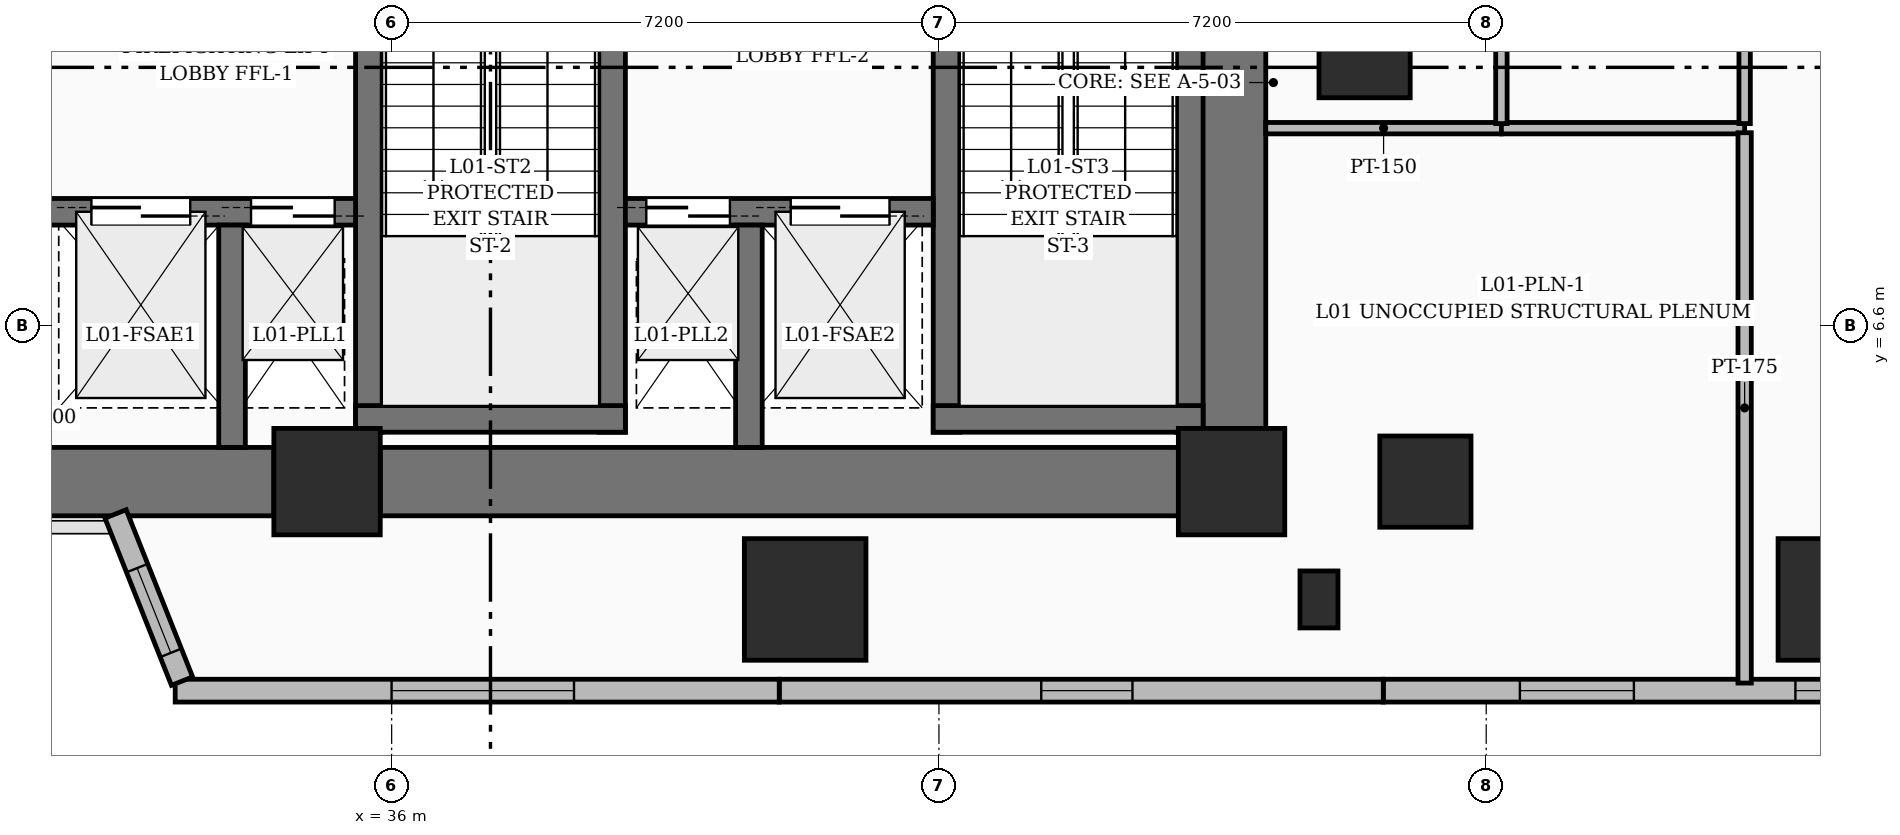
"""IFC4 building model, lengths in metres.
Left out: names, types, materials, properties, quantities, classifications, styles, units other than length and angle.
Written with IfcOpenShell. Run it as: python <this file> out.ifc"""

import sys

from ifc_helpers import new_model, si_unit, direction, frame, frame_2d, origin, origin_2d, place, context, subcontext, project, spatial, rectangle, extrude, element, fill, save


model = new_model("IFC4")
c1 = context("Model", 3, precision=1e-05, world=origin(), true_north=direction((0.0, 1.0)))
c2 = subcontext(c1, "Body", "Model", "MODEL_VIEW")
j1 = project(units=[si_unit("LENGTHUNIT", "METRE"), si_unit("PLANEANGLEUNIT", "RADIAN")], contexts=[c1])
p1 = place(None, origin())
s1 = spatial("IfcSite", under=j1, at=p1, CompositionType="ELEMENT")
p2 = place(p1, origin())
s2 = spatial("IfcBuilding", under=s1, at=p2, CompositionType="ELEMENT")
p3 = place(p2, frame((0.0, 0.0, 8.4)))
s3 = spatial("IfcBuildingStorey", under=s2, at=p3, CompositionType="ELEMENT", Elevation=8.4)
for number, where, z_axis, x_axis in (
    (1, (35.15, 4.55, 0.0), (0.0, 0.0, 1.0), (1.0, 0.0, 0.0)),
    (2, (47.05, 4.55, 0.0), (0.0, 0.0, 1.0), (1.0, 0.0, 0.0)),
):
    element("IfcColumn", number, at=place(p3, frame(where, z_axis=z_axis, x_axis=x_axis)), inside=s3, PredefinedType="COLUMN", context=c2, shape_type="SweptSolid", body=[
        extrude(rectangle(XDim=1.4, YDim=1.4, at=origin_2d()), origin(), (0.0, 0.0, 1.0), 4.5),
    ])
for number, where, z_axis, x_axis in (
    (3, (49.6, 4.55, 0.0), (0.0, 0.0, 1.0), (1.0, 0.0, 0.0)),
    (4, (48.8, 10.2, 0.0), (0.0, 0.0, 1.0), (1.0, 0.0, 0.0)),
):
    element("IfcColumn", number, at=place(p3, frame(where, z_axis=z_axis, x_axis=x_axis)), inside=s3, PredefinedType="COLUMN", context=c2, shape_type="SweptSolid", body=[
        extrude(rectangle(XDim=1.2, YDim=1.2, at=origin_2d()), origin(), (0.0, 0.0, 1.0), 4.5),
    ])
p4 = place(p3, frame((28.25, 4.55, 0.0), z_axis=(0.0, 0.0, 1.0), x_axis=(1.0, 0.0, 0.0)))
e5 = element("IfcWall", 5, at=p4, inside=s3, PredefinedType="SHEAR", context=c2, shape_type="SweptSolid", body=[
    extrude(rectangle(XDim=6.2, YDim=0.9, at=frame_2d((3.1, 0.0))), origin(), (0.0, 0.0, 1.0), 4.5),
])
p5 = place(p3, frame((35.85, 4.55, 0.0), z_axis=(0.0, 0.0, 1.0), x_axis=(1.0, 0.0, 0.0)))
e6 = element("IfcWall", 6, at=p5, inside=s3, PredefinedType="SHEAR", context=c2, shape_type="SweptSolid", body=[
    extrude(rectangle(XDim=10.5, YDim=0.9, at=frame_2d((5.25, 0.0))), origin(), (0.0, 0.0, 1.0), 4.5),
])
p6 = place(p3, frame((47.05, 5.25, 0.0), z_axis=(0.0, 0.0, 1.0), x_axis=(0.0, 1.0, 0.0)))
e7 = element("IfcWall", 7, at=p6, inside=s3, PredefinedType="SHEAR", context=c2, shape_type="SweptSolid", body=[
    extrude(rectangle(XDim=8.8, YDim=0.9, at=frame_2d((4.4, 0.0))), origin(), (0.0, 0.0, 1.0), 4.5),
])
p7 = place(p3, frame((35.7, 5.2, 0.0), z_axis=(0.0, 0.0, 1.0), x_axis=(0.0, 1.0, 0.0)))
e8 = element("IfcWall", 8, at=p7, inside=s3, PredefinedType="SOLIDWALL", context=c2, shape_type="SweptSolid", body=[
    extrude(rectangle(XDim=9.1, YDim=0.35, at=frame_2d((4.55, 0.0))), origin(), (0.0, 0.0, 1.0), 4.5),
])
p8 = place(p7, frame((6.02, 0.0, 0.0)))
e9 = element("IfcOpeningElement", 9, at=p8, cuts=e8, PredefinedType="OPENING", context=c2, shape_type="SweptSolid", body=[
    extrude(rectangle(XDim=1.0, YDim=2.15, at=frame_2d((0.5, 1.075))), frame((0.0, 0.185, 0.0), z_axis=(0.0, -1.0, 0.0), x_axis=(1.0, 0.0, 0.0)), (0.0, 0.0, 1.0), 0.37),
])
p9 = place(p3, frame((38.9, 5.2, 0.0), z_axis=(0.0, 0.0, 1.0), x_axis=(0.0, 1.0, 0.0)))
e10 = element("IfcWall", 10, at=p9, inside=s3, PredefinedType="SOLIDWALL", context=c2, shape_type="SweptSolid", body=[
    extrude(rectangle(XDim=9.1, YDim=0.35, at=frame_2d((4.55, 0.0))), origin(), (0.0, 0.0, 1.0), 4.5),
])
p10 = place(p9, frame((6.02, 0.0, 0.0)))
e11 = element("IfcOpeningElement", 11, at=p10, cuts=e10, PredefinedType="OPENING", context=c2, shape_type="SweptSolid", body=[
    extrude(rectangle(XDim=1.0, YDim=2.15, at=frame_2d((0.5, 1.075))), frame((0.0, 0.185, 0.0), z_axis=(0.0, -1.0, 0.0), x_axis=(1.0, 0.0, 0.0)), (0.0, 0.0, 1.0), 0.37),
])
p11 = place(p3, frame((35.525, 5.375, 0.0), z_axis=(0.0, 0.0, 1.0), x_axis=(1.0, 0.0, 0.0)))
e12 = element("IfcWall", 12, at=p11, inside=s3, PredefinedType="SOLIDWALL", context=c2, shape_type="SweptSolid", body=[
    extrude(rectangle(XDim=3.55, YDim=0.35, at=frame_2d((1.775, 0.0))), origin(), (0.0, 0.0, 1.0), 4.5),
])
p12 = place(p3, frame((43.3, 5.2, 0.0), z_axis=(0.0, 0.0, 1.0), x_axis=(0.0, 1.0, 0.0)))
e13 = element("IfcWall", 13, at=p12, inside=s3, PredefinedType="SOLIDWALL", context=c2, shape_type="SweptSolid", body=[
    extrude(rectangle(XDim=9.1, YDim=0.35, at=frame_2d((4.55, 0.0))), origin(), (0.0, 0.0, 1.0), 4.5),
])
p13 = place(p12, frame((6.02, 0.0, 0.0)))
e14 = element("IfcOpeningElement", 14, at=p13, cuts=e13, PredefinedType="OPENING", context=c2, shape_type="SweptSolid", body=[
    extrude(rectangle(XDim=1.0, YDim=2.15, at=frame_2d((0.5, 1.075))), frame((0.0, 0.185, 0.0), z_axis=(0.0, -1.0, 0.0), x_axis=(1.0, 0.0, 0.0)), (0.0, 0.0, 1.0), 0.37),
])
p14 = place(p3, frame((46.5, 5.2, 0.0), z_axis=(0.0, 0.0, 1.0), x_axis=(0.0, 1.0, 0.0)))
e15 = element("IfcWall", 15, at=p14, inside=s3, PredefinedType="SOLIDWALL", context=c2, shape_type="SweptSolid", body=[
    extrude(rectangle(XDim=9.1, YDim=0.35, at=frame_2d((4.55, 0.0))), origin(), (0.0, 0.0, 1.0), 4.5),
])
p15 = place(p3, frame((43.125, 5.375, 0.0), z_axis=(0.0, 0.0, 1.0), x_axis=(1.0, 0.0, 0.0)))
e16 = element("IfcWall", 16, at=p15, inside=s3, PredefinedType="SOLIDWALL", context=c2, shape_type="SweptSolid", body=[
    extrude(rectangle(XDim=3.55, YDim=0.35, at=frame_2d((1.775, 0.0))), origin(), (0.0, 0.0, 1.0), 4.5),
])
p16 = place(p3, frame((31.475, 8.1, 0.0), z_axis=(0.0, 0.0, 1.0), x_axis=(1.0, 0.0, 0.0)))
e17 = element("IfcWall", 17, at=p16, inside=s3, PredefinedType="SOLIDWALL", context=c2, shape_type="SweptSolid", body=[
    extrude(rectangle(XDim=4.05, YDim=0.35, at=frame_2d((2.025, 0.0))), origin(), (0.0, 0.0, 1.0), 4.5),
])
p17 = place(p16, frame((0.575, 0.0, 0.0)))
e18 = element("IfcOpeningElement", 18, at=p17, cuts=e17, PredefinedType="OPENING", context=c2, shape_type="SweptSolid", body=[
    extrude(rectangle(XDim=1.3, YDim=2.25, at=frame_2d((0.65, 1.125))), frame((0.0, 0.185, 0.0), z_axis=(0.0, -1.0, 0.0), x_axis=(1.0, 0.0, 0.0)), (0.0, 0.0, 1.0), 0.37),
])
p18 = place(p16, frame((2.675, 0.0, 0.0)))
e19 = element("IfcOpeningElement", 19, at=p18, cuts=e17, PredefinedType="OPENING", context=c2, shape_type="SweptSolid", body=[
    extrude(rectangle(XDim=1.1, YDim=2.2, at=frame_2d((0.55, 1.1))), frame((0.0, 0.185, 0.0), z_axis=(0.0, -1.0, 0.0), x_axis=(1.0, 0.0, 0.0)), (0.0, 0.0, 1.0), 0.37),
])
p19 = place(p3, frame((39.075, 8.1, 0.0), z_axis=(0.0, 0.0, 1.0), x_axis=(1.0, 0.0, 0.0)))
e20 = element("IfcWall", 20, at=p19, inside=s3, PredefinedType="SOLIDWALL", context=c2, shape_type="SweptSolid", body=[
    extrude(rectangle(XDim=4.05, YDim=0.35, at=frame_2d((2.025, 0.0))), origin(), (0.0, 0.0, 1.0), 4.5),
])
p20 = place(p19, frame((2.175, 0.0, 0.0)))
e21 = element("IfcOpeningElement", 21, at=p20, cuts=e20, PredefinedType="OPENING", context=c2, shape_type="SweptSolid", body=[
    extrude(rectangle(XDim=1.3, YDim=2.25, at=frame_2d((0.65, 1.125))), frame((0.0, 0.185, 0.0), z_axis=(0.0, -1.0, 0.0), x_axis=(1.0, 0.0, 0.0)), (0.0, 0.0, 1.0), 0.37),
])
p21 = place(p19, frame((0.275, 0.0, 0.0)))
e22 = element("IfcOpeningElement", 22, at=p21, cuts=e20, PredefinedType="OPENING", context=c2, shape_type="SweptSolid", body=[
    extrude(rectangle(XDim=1.1, YDim=2.2, at=frame_2d((0.55, 1.1))), frame((0.0, 0.185, 0.0), z_axis=(0.0, -1.0, 0.0), x_axis=(1.0, 0.0, 0.0)), (0.0, 0.0, 1.0), 0.37),
])
for number, where, z_axis, x_axis in (
    (23, (33.9, 5.0, 0.0), (0.0, 0.0, 1.0), (0.0, 1.0, 0.0)),
    (24, (40.7, 5.0, 0.0), (0.0, 0.0, 1.0), (0.0, 1.0, 0.0)),
):
    element("IfcWall", number, at=place(p3, frame(where, z_axis=z_axis, x_axis=x_axis)), inside=s3, PredefinedType="SOLIDWALL", context=c2, shape_type="SweptSolid", body=[
        extrude(rectangle(XDim=2.925, YDim=0.35, at=frame_2d((1.462, 0.0))), origin(), (0.0, 0.0, 1.0), 4.5),
    ])
for number, where, z_axis, x_axis in (
    (25, (41.44, 3.0, 0.0), (0.0, 0.0, 1.0), (1.0, 0.0, 0.0)),
    (26, (55.04, 3.0, 0.0), (0.0, 0.0, 1.0), (1.0, 0.0, 0.0)),
):
    element("IfcColumn", number, at=place(p3, frame(where, z_axis=z_axis, x_axis=x_axis)), inside=s3, PredefinedType="COLUMN", context=c2, shape_type="SweptSolid", body=[
        extrude(rectangle(XDim=1.6, YDim=1.6, at=origin_2d()), origin(), (0.0, 0.0, 1.0), 4.5),
    ])
p22 = place(p3, frame((48.2, 3.0, 0.0), z_axis=(0.0, 0.0, 1.0), x_axis=(1.0, 0.0, 0.0)))
e27 = element("IfcColumn", 27, at=p22, inside=s3, PredefinedType="PILASTER", context=c2, shape_type="SweptSolid", body=[
    extrude(rectangle(XDim=0.5, YDim=0.75, at=origin_2d()), origin(), (0.0, 0.0, 1.0), 4.5),
])
p23 = place(p3, frame((56.993, 1.8, 0.0), z_axis=(0.0, 0.0, 1.0), x_axis=(-1.0, 0.0, 0.0)))
e28 = element("IfcWall", 28, at=p23, inside=s3, PredefinedType="SOLIDWALL", context=c2, shape_type="SweptSolid", body=[
    extrude(rectangle(XDim=7.947, YDim=0.3, at=frame_2d((3.974, 0.0))), origin(), (0.0, 0.0, 1.0), 4.2),
])
p24 = place(p23, frame((4.65, 0.0, 0.6)))
e29 = element("IfcOpeningElement", 29, at=p24, cuts=e28, PredefinedType="OPENING", context=c2, shape_type="SweptSolid", body=[
    extrude(rectangle(XDim=1.5, YDim=2.1, at=frame_2d((0.75, 1.05))), frame((0.0, 0.16, 0.0), z_axis=(0.0, -1.0, 0.0), x_axis=(1.0, 0.0, 0.0)), (0.0, 0.0, 1.0), 0.32),
])
p25 = place(p23, frame((1.025, 0.0, 0.6)))
e30 = element("IfcOpeningElement", 30, at=p25, cuts=e28, PredefinedType="OPENING", context=c2, shape_type="SweptSolid", body=[
    extrude(rectangle(XDim=1.5, YDim=2.1, at=frame_2d((0.75, 1.05))), frame((0.0, 0.16, 0.0), z_axis=(0.0, -1.0, 0.0), x_axis=(1.0, 0.0, 0.0)), (0.0, 0.0, 1.0), 0.32),
])
p26 = place(p3, frame((49.046, 1.8, 0.0), z_axis=(0.0, 0.0, 1.0), x_axis=(-1.0, 0.0, 0.0)))
e31 = element("IfcWall", 31, at=p26, inside=s3, PredefinedType="SOLIDWALL", context=c2, shape_type="SweptSolid", body=[
    extrude(rectangle(XDim=7.947, YDim=0.3, at=frame_2d((3.973, 0.0))), origin(), (0.0, 0.0, 1.0), 4.2),
])
p27 = place(p26, frame((3.3, 0.0, 0.8)))
e32 = element("IfcOpeningElement", 32, at=p27, cuts=e31, PredefinedType="OPENING", context=c2, shape_type="SweptSolid", body=[
    extrude(rectangle(XDim=1.2, YDim=1.8, at=frame_2d((0.6, 0.9))), frame((0.0, 0.16, 0.0), z_axis=(0.0, -1.0, 0.0), x_axis=(1.0, 0.0, 0.0)), (0.0, 0.0, 1.0), 0.32),
])
p28 = place(p3, frame((41.099, 1.8, 0.0), z_axis=(0.0, 0.0, 1.0), x_axis=(-1.0, 0.0, 0.0)))
e33 = element("IfcWall", 33, at=p28, inside=s3, PredefinedType="SOLIDWALL", context=c2, shape_type="SweptSolid", body=[
    extrude(rectangle(XDim=7.947, YDim=0.3, at=frame_2d((3.974, 0.0))), origin(), (0.0, 0.0, 1.0), 4.2),
])
p29 = place(p28, frame((2.7, 0.0, 0.6)))
e34 = element("IfcOpeningElement", 34, at=p29, cuts=e33, PredefinedType="OPENING", context=c2, shape_type="SweptSolid", body=[
    extrude(rectangle(XDim=2.4, YDim=2.1, at=frame_2d((1.2, 1.05))), frame((0.0, 0.16, 0.0), z_axis=(0.0, -1.0, 0.0), x_axis=(1.0, 0.0, 0.0)), (0.0, 0.0, 1.0), 0.32),
])
p30 = place(p3, frame((33.242, 1.925, 0.0), z_axis=(0.0, 0.0, 1.0), x_axis=(-0.36946923074, 0.92924296475, 0.0)))
e35 = element("IfcWall", 35, at=p30, inside=s3, PredefinedType="SOLIDWALL", context=c2, shape_type="SweptSolid", body=[
    extrude(rectangle(XDim=2.367, YDim=0.3, at=frame_2d((1.184, 0.0))), origin(), (0.0, 0.0, 1.0), 2.975),
])
p31 = place(p30, frame((0.4, 0.0, 0.8)))
e36 = element("IfcOpeningElement", 36, at=p31, cuts=e35, PredefinedType="OPENING", context=c2, shape_type="SweptSolid", body=[
    extrude(rectangle(XDim=1.2, YDim=1.8, at=frame_2d((0.6, 0.9))), frame((0.0, 0.16, 0.0), z_axis=(0.0, -1.0, 0.0), x_axis=(1.0, 0.0, 0.0)), (0.0, 0.0, 1.0), 0.32),
])
p32 = place(p3, frame((50.6, 9.2, 0.0), z_axis=(0.0, 0.0, 1.0), x_axis=(-1.0, 0.0, 0.0)))
e37 = element("IfcWall", 37, at=p32, inside=s3, PredefinedType="PARTITIONING", context=c2, shape_type="SweptSolid", body=[
    extrude(rectangle(XDim=3.1, YDim=0.15, at=frame_2d((1.55, 0.0))), origin(), (0.0, 0.0, 1.0), 3.159),
])
p33 = place(p3, frame((53.8, 9.2, 0.0), z_axis=(0.0, 0.0, 1.0), x_axis=(-1.0, 0.0, 0.0)))
e38 = element("IfcWall", 38, at=p33, inside=s3, PredefinedType="PARTITIONING", context=c2, shape_type="SweptSolid", body=[
    extrude(rectangle(XDim=3.2, YDim=0.15, at=frame_2d((1.6, 0.0))), origin(), (0.0, 0.0, 1.0), 3.621),
])
p34 = place(p3, frame((53.8, 1.9, 0.0), z_axis=(0.0, 0.0, 1.0), x_axis=(0.0, 1.0, 0.0)))
e39 = element("IfcWall", 39, at=p34, inside=s3, PredefinedType="PARTITIONING", context=c2, shape_type="SweptSolid", body=[
    extrude(rectangle(XDim=7.24, YDim=0.175, at=frame_2d((3.62, 0.0))), origin(), (0.0, 0.0, 1.0), 2.97),
])
p35 = place(p3, frame((50.6, 9.26, 0.0), z_axis=(0.0, 0.0, 1.0), x_axis=(0.0, 1.0, 0.0)))
e40 = element("IfcWall", 40, at=p35, inside=s3, PredefinedType="PARTITIONING", context=c2, shape_type="SweptSolid", body=[
    extrude(rectangle(XDim=6.09, YDim=0.15, at=frame_2d((3.045, 0.0))), origin(), (0.0, 0.0, 1.0), 3.078),
])
p36 = place(p3, frame((53.8, 9.26, 0.0), z_axis=(0.0, 0.0, 1.0), x_axis=(0.0, 1.0, 0.0)))
e41 = element("IfcWall", 41, at=p36, inside=s3, PredefinedType="PARTITIONING", context=c2, shape_type="SweptSolid", body=[
    extrude(rectangle(XDim=6.03, YDim=0.15, at=frame_2d((3.015, 0.0))), origin(), (0.0, 0.0, 1.0), 3.078),
])
p37 = place(p24, origin())
e42 = element("IfcWindow", 42, at=p37, inside=s3, PartitioningType="SINGLE_PANEL", PredefinedType="WINDOW", context=c2, shape_type="SweptSolid", body=[
    extrude(rectangle(XDim=1.5, YDim=2.1, at=frame_2d((0.75, 1.05))), frame((0.0, 0.03, 0.0), z_axis=(0.0, -1.0, 0.0), x_axis=(1.0, 0.0, 0.0)), (0.0, 0.0, 1.0), 0.06),
])
fill(e29, e42)
p38 = place(p25, origin())
e43 = element("IfcWindow", 43, at=p38, inside=s3, PartitioningType="SINGLE_PANEL", PredefinedType="WINDOW", context=c2, shape_type="SweptSolid", body=[
    extrude(rectangle(XDim=1.5, YDim=2.1, at=frame_2d((0.75, 1.05))), frame((0.0, 0.03, 0.0), z_axis=(0.0, -1.0, 0.0), x_axis=(1.0, 0.0, 0.0)), (0.0, 0.0, 1.0), 0.06),
])
fill(e30, e43)
p39 = place(p27, origin())
e44 = element("IfcWindow", 44, at=p39, inside=s3, PartitioningType="SINGLE_PANEL", PredefinedType="WINDOW", context=c2, shape_type="SweptSolid", body=[
    extrude(rectangle(XDim=1.2, YDim=1.8, at=frame_2d((0.6, 0.9))), frame((0.0, 0.03, 0.0), z_axis=(0.0, -1.0, 0.0), x_axis=(1.0, 0.0, 0.0)), (0.0, 0.0, 1.0), 0.06),
])
fill(e32, e44)
p40 = place(p29, origin())
e45 = element("IfcWindow", 45, at=p40, inside=s3, PartitioningType="SINGLE_PANEL", PredefinedType="WINDOW", context=c2, shape_type="SweptSolid", body=[
    extrude(rectangle(XDim=2.4, YDim=2.1, at=frame_2d((1.2, 1.05))), frame((0.0, 0.03, 0.0), z_axis=(0.0, -1.0, 0.0), x_axis=(1.0, 0.0, 0.0)), (0.0, 0.0, 1.0), 0.06),
])
fill(e34, e45)
p41 = place(p31, origin())
e46 = element("IfcWindow", 46, at=p41, inside=s3, PartitioningType="SINGLE_PANEL", PredefinedType="WINDOW", context=c2, shape_type="SweptSolid", body=[
    extrude(rectangle(XDim=1.2, YDim=1.8, at=frame_2d((0.6, 0.9))), frame((0.0, 0.03, 0.0), z_axis=(0.0, -1.0, 0.0), x_axis=(1.0, 0.0, 0.0)), (0.0, 0.0, 1.0), 0.06),
])
fill(e36, e46)
p42 = place(p17, origin())
e47 = element("IfcDoor", 47, at=p42, inside=s3, OperationType="DOUBLE_DOOR_SLIDING", PredefinedType="DOOR", context=c2, shape_type="SweptSolid", body=[
    extrude(rectangle(XDim=1.3, YDim=2.25, at=frame_2d((0.65, 1.125))), frame((0.0, 0.025, 0.0), z_axis=(0.0, -1.0, 0.0), x_axis=(1.0, 0.0, 0.0)), (0.0, 0.0, 1.0), 0.05),
])
fill(e18, e47)
p43 = place(p20, origin())
e48 = element("IfcDoor", 48, at=p43, inside=s3, OperationType="DOUBLE_DOOR_SLIDING", PredefinedType="DOOR", context=c2, shape_type="SweptSolid", body=[
    extrude(rectangle(XDim=1.3, YDim=2.25, at=frame_2d((0.65, 1.125))), frame((0.0, 0.025, 0.0), z_axis=(0.0, -1.0, 0.0), x_axis=(1.0, 0.0, 0.0)), (0.0, 0.0, 1.0), 0.05),
])
fill(e21, e48)
p44 = place(p18, origin())
e49 = element("IfcDoor", 49, at=p44, inside=s3, OperationType="DOUBLE_DOOR_SLIDING", PredefinedType="DOOR", context=c2, shape_type="SweptSolid", body=[
    extrude(rectangle(XDim=1.1, YDim=2.2, at=frame_2d((0.55, 1.1))), frame((0.0, 0.025, 0.0), z_axis=(0.0, -1.0, 0.0), x_axis=(1.0, 0.0, 0.0)), (0.0, 0.0, 1.0), 0.05),
])
fill(e19, e49)
p45 = place(p21, origin())
e50 = element("IfcDoor", 50, at=p45, inside=s3, OperationType="DOUBLE_DOOR_SLIDING", PredefinedType="DOOR", context=c2, shape_type="SweptSolid", body=[
    extrude(rectangle(XDim=1.1, YDim=2.2, at=frame_2d((0.55, 1.1))), frame((0.0, 0.025, 0.0), z_axis=(0.0, -1.0, 0.0), x_axis=(1.0, 0.0, 0.0)), (0.0, 0.0, 1.0), 0.05),
])
fill(e22, e50)
save(model, sys.argv[1])
